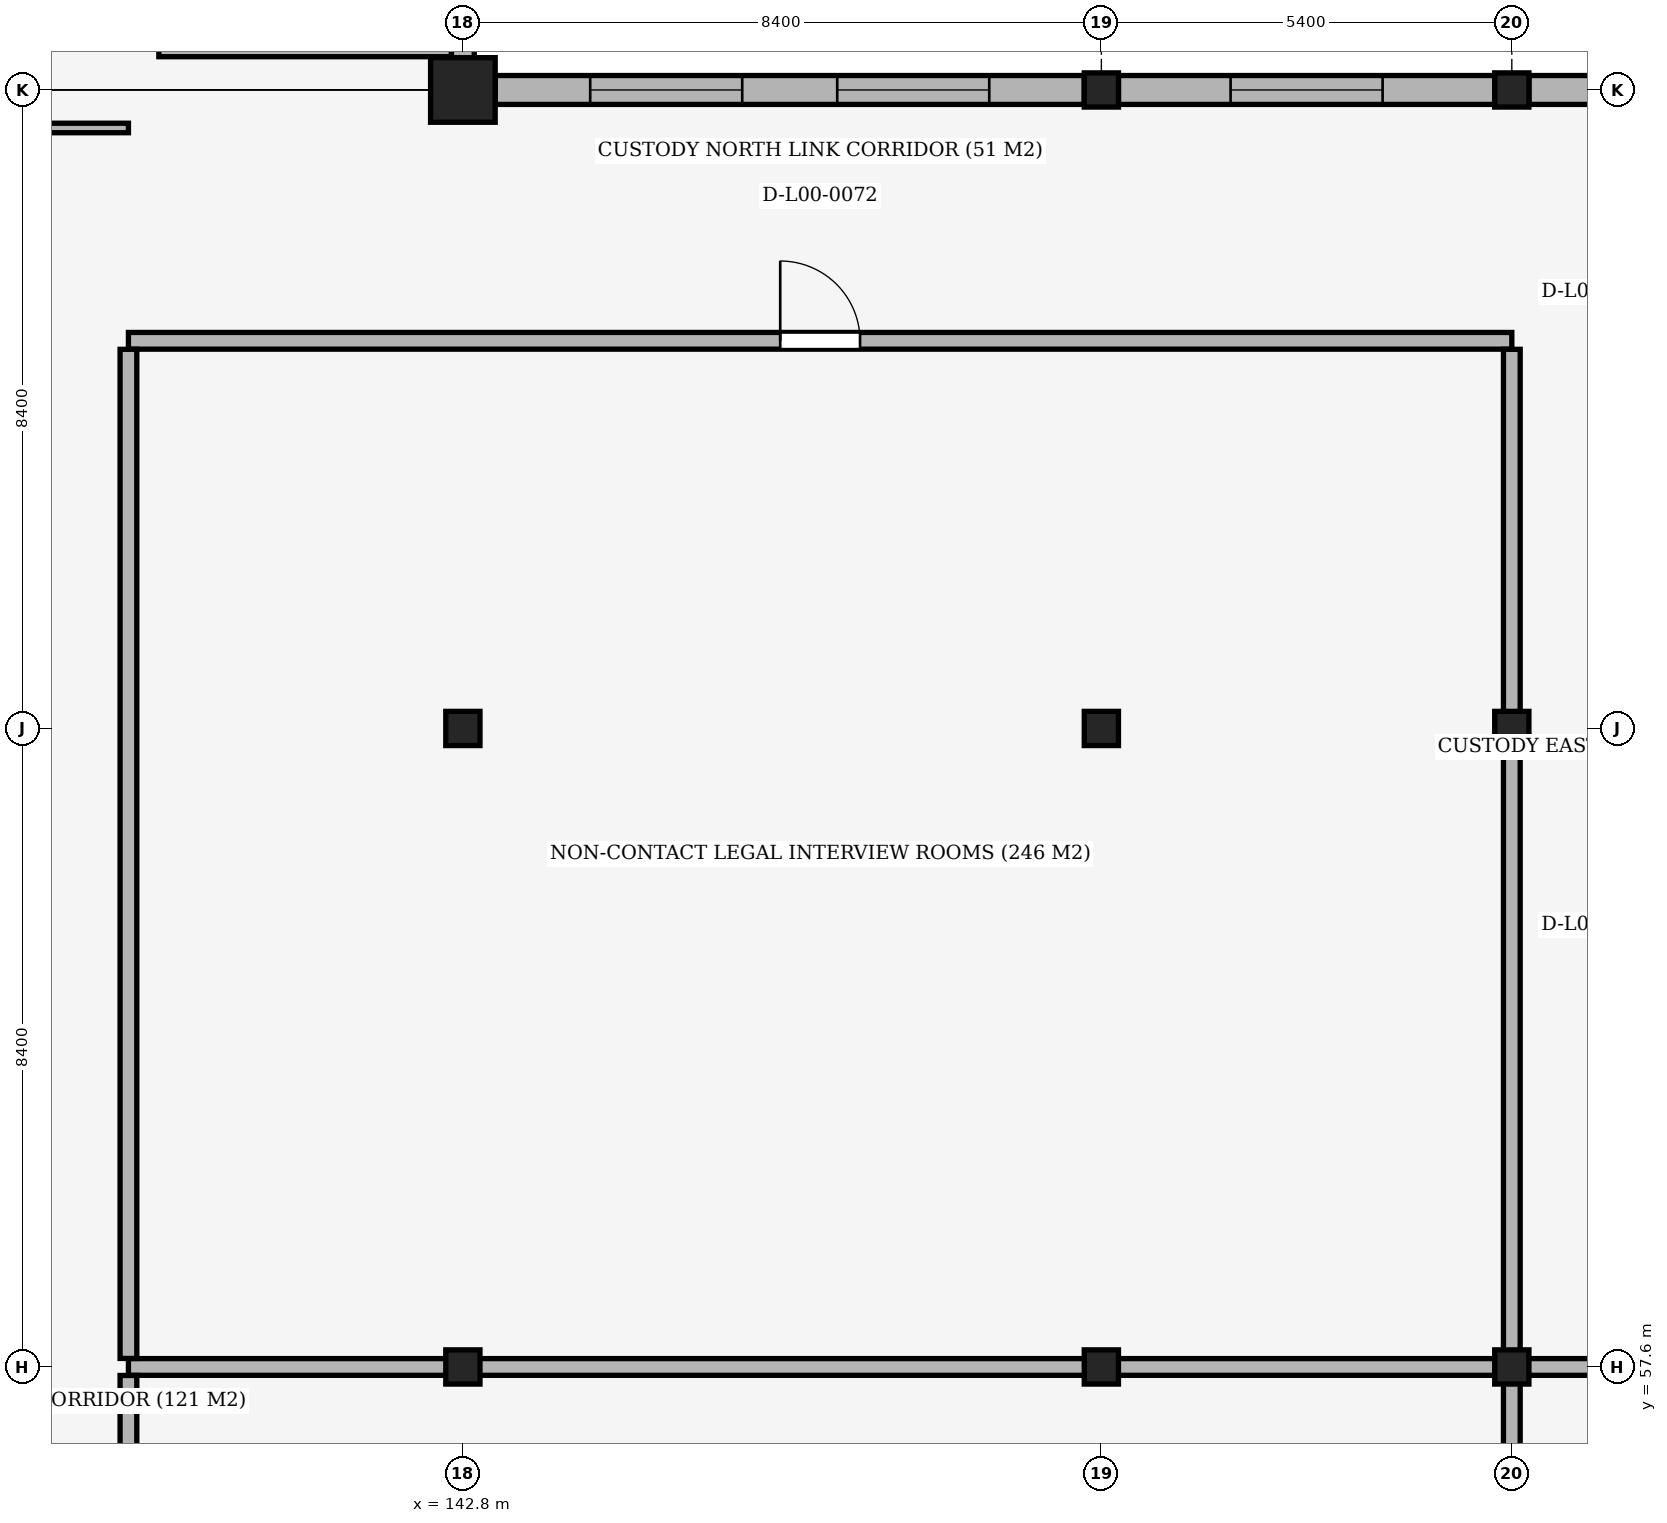
"""IFC4 building model, lengths in metres.
Left out: names, types, materials, properties, quantities, classifications, styles, units other than length and angle.
Written with IfcOpenShell. Run it as: python <this file> out.ifc"""

import sys

from ifc_helpers import new_model, si_unit, direction, frame, frame_2d, origin, origin_2d, place, context, subcontext, project, spatial, rectangle, extrude, element, fill, save


model = new_model("IFC4")
c1 = context("Model", 3, precision=1e-05, world=origin(), true_north=direction((0.0, 1.0)))
c2 = subcontext(c1, "Body", "Model", "MODEL_VIEW")
j1 = project(units=[si_unit("LENGTHUNIT", "METRE"), si_unit("PLANEANGLEUNIT", "RADIAN")], contexts=[c1])
p1 = place(None, origin())
s1 = spatial("IfcSite", under=j1, at=p1, CompositionType="ELEMENT")
p2 = place(p1, origin())
s2 = spatial("IfcBuilding", under=s1, at=p2, CompositionType="ELEMENT")
p3 = place(p2, origin())
s3 = spatial("IfcBuildingStorey", under=s2, at=p3, CompositionType="ELEMENT", Elevation=0.0)
for number, where, z_axis, x_axis in (
    (1, (142.8, 57.6, 0.0), (0.0, 0.0, 1.0), (1.0, 0.0, 0.0)),
    (2, (142.8, 66.0, 0.0), (0.0, 0.0, 1.0), (1.0, 0.0, 0.0)),
):
    element("IfcColumn", number, at=place(p3, frame(where, z_axis=z_axis, x_axis=x_axis)), inside=s3, PredefinedType="COLUMN", context=c2, shape_type="SweptSolid", body=[
        extrude(rectangle(XDim=0.45, YDim=0.45, at=origin_2d()), origin(), (0.0, 0.0, 1.0), 5.1),
    ])
p4 = place(p3, frame((142.8, 74.4, 0.0), z_axis=(0.0, 0.0, 1.0), x_axis=(1.0, 0.0, 0.0)))
e3 = element("IfcColumn", 3, at=p4, inside=s3, PredefinedType="COLUMN", context=c2, shape_type="SweptSolid", body=[
    extrude(rectangle(XDim=0.85, YDim=0.85, at=origin_2d()), origin(), (0.0, 0.0, 1.0), 5.1),
])
for number, where, z_axis, x_axis in (
    (4, (151.2, 57.6, 0.0), (0.0, 0.0, 1.0), (1.0, 0.0, 0.0)),
    (5, (151.2, 66.0, 0.0), (0.0, 0.0, 1.0), (1.0, 0.0, 0.0)),
    (6, (151.2, 74.4, 0.0), (0.0, 0.0, 1.0), (1.0, 0.0, 0.0)),
    (7, (156.6, 57.6, 0.0), (0.0, 0.0, 1.0), (1.0, 0.0, 0.0)),
    (8, (156.6, 66.0, 0.0), (0.0, 0.0, 1.0), (1.0, 0.0, 0.0)),
    (9, (156.6, 74.4, 0.0), (0.0, 0.0, 1.0), (1.0, 0.0, 0.0)),
):
    element("IfcColumn", number, at=place(p3, frame(where, z_axis=z_axis, x_axis=x_axis)), inside=s3, PredefinedType="COLUMN", context=c2, shape_type="SweptSolid", body=[
        extrude(rectangle(XDim=0.45, YDim=0.45, at=origin_2d()), origin(), (0.0, 0.0, 1.0), 5.1),
    ])
p5 = place(p3, frame((142.8, 79.375, 0.0), z_axis=(0.0, 0.0, 1.0), x_axis=(0.0, -1.0, 0.0)))
e10 = element("IfcWall", 10, at=p5, inside=s3, PredefinedType="SOLIDWALL", context=c2, shape_type="SweptSolid", body=[
    extrude(rectangle(XDim=4.55, YDim=0.3, at=frame_2d((2.275, 0.0))), origin(), (0.0, 0.0, 1.0), 4.17),
])
p6 = place(p5, frame((0.717, 0.0, 0.85)))
e11 = element("IfcOpeningElement", 11, at=p6, cuts=e10, PredefinedType="OPENING", context=c2, shape_type="SweptSolid", body=[
    extrude(rectangle(XDim=1.2, YDim=2.4, at=frame_2d((0.6, 1.2))), frame((0.0, 0.165, 0.0), z_axis=(0.0, -1.0, 0.0), x_axis=(1.0, 0.0, 0.0)), (0.0, 0.0, 1.0), 0.33),
])
p7 = place(p5, frame((2.633, 0.0, 0.85)))
e12 = element("IfcOpeningElement", 12, at=p7, cuts=e10, PredefinedType="OPENING", context=c2, shape_type="SweptSolid", body=[
    extrude(rectangle(XDim=1.2, YDim=2.4, at=frame_2d((0.6, 1.2))), frame((0.0, 0.165, 0.0), z_axis=(0.0, -1.0, 0.0), x_axis=(1.0, 0.0, 0.0)), (0.0, 0.0, 1.0), 0.33),
])
p8 = place(p3, frame((143.225, 74.4, 0.0), z_axis=(0.0, 0.0, 1.0), x_axis=(1.0, 0.0, 0.0)))
e13 = element("IfcWall", 13, at=p8, inside=s3, PredefinedType="SOLIDWALL", context=c2, shape_type="SweptSolid", body=[
    extrude(rectangle(XDim=7.75, YDim=0.38, at=frame_2d((3.875, 0.0))), origin(), (0.0, 0.0, 1.0), 4.07),
])
p9 = place(p8, frame((1.25, 0.0, 2.1)))
e14 = element("IfcOpeningElement", 14, at=p9, cuts=e13, PredefinedType="OPENING", context=c2, shape_type="SweptSolid", body=[
    extrude(rectangle(XDim=2.0, YDim=1.2, at=frame_2d((1.0, 0.6))), frame((0.0, 0.205, 0.0), z_axis=(0.0, -1.0, 0.0), x_axis=(1.0, 0.0, 0.0)), (0.0, 0.0, 1.0), 0.41),
])
p10 = place(p8, frame((4.5, 0.0, 2.1)))
e15 = element("IfcOpeningElement", 15, at=p10, cuts=e13, PredefinedType="OPENING", context=c2, shape_type="SweptSolid", body=[
    extrude(rectangle(XDim=2.0, YDim=1.2, at=frame_2d((1.0, 0.6))), frame((0.0, 0.205, 0.0), z_axis=(0.0, -1.0, 0.0), x_axis=(1.0, 0.0, 0.0)), (0.0, 0.0, 1.0), 0.41),
])
p11 = place(p3, frame((151.425, 74.4, 0.0), z_axis=(0.0, 0.0, 1.0), x_axis=(1.0, 0.0, 0.0)))
e16 = element("IfcWall", 16, at=p11, inside=s3, PredefinedType="SOLIDWALL", context=c2, shape_type="SweptSolid", body=[
    extrude(rectangle(XDim=4.95, YDim=0.38, at=frame_2d((2.475, 0.0))), origin(), (0.0, 0.0, 1.0), 4.07),
])
p12 = place(p11, frame((1.475, 0.0, 2.1)))
e17 = element("IfcOpeningElement", 17, at=p12, cuts=e16, PredefinedType="OPENING", context=c2, shape_type="SweptSolid", body=[
    extrude(rectangle(XDim=2.0, YDim=1.2, at=frame_2d((1.0, 0.6))), frame((0.0, 0.205, 0.0), z_axis=(0.0, -1.0, 0.0), x_axis=(1.0, 0.0, 0.0)), (0.0, 0.0, 1.0), 0.41),
])
p13 = place(p3, frame((156.825, 74.4, 0.0), z_axis=(0.0, 0.0, 1.0), x_axis=(1.0, 0.0, 0.0)))
e18 = element("IfcWall", 18, at=p13, inside=s3, PredefinedType="SOLIDWALL", context=c2, shape_type="SweptSolid", body=[
    extrude(rectangle(XDim=4.95, YDim=0.38, at=frame_2d((2.475, 0.0))), origin(), (0.0, 0.0, 1.0), 4.22),
])
p14 = place(p3, frame((138.4, 57.6, 0.0), z_axis=(0.0, 0.0, 1.0), x_axis=(1.0, 0.0, 0.0)))
e19 = element("IfcWall", 19, at=p14, inside=s3, PredefinedType="PARTITIONING", context=c2, shape_type="SweptSolid", body=[
    extrude(rectangle(XDim=18.2, YDim=0.22, at=frame_2d((9.1, 0.0))), origin(), (0.0, 0.0, 1.0), 4.02),
])
p15 = place(p3, frame((156.6, 57.6, 0.0), z_axis=(0.0, 0.0, 1.0), x_axis=(1.0, 0.0, 0.0)))
e20 = element("IfcWall", 20, at=p15, inside=s3, PredefinedType="PARTITIONING", context=c2, shape_type="SweptSolid", body=[
    extrude(rectangle(XDim=3.6, YDim=0.22, at=frame_2d((1.8, 0.0))), origin(), (0.0, 0.0, 1.0), 4.02),
])
p16 = place(p15, frame((1.275, 0.0, 0.0)))
e21 = element("IfcOpeningElement", 21, at=p16, cuts=e20, PredefinedType="OPENING", context=c2, shape_type="SweptSolid", body=[
    extrude(rectangle(XDim=1.05, YDim=2.15, at=frame_2d((0.525, 1.075))), frame((0.0, 0.125, 0.0), z_axis=(0.0, -1.0, 0.0), x_axis=(1.0, 0.0, 0.0)), (0.0, 0.0, 1.0), 0.25),
])
p17 = place(p3, frame((138.4, 71.1, 0.0), z_axis=(0.0, 0.0, 1.0), x_axis=(1.0, 0.0, 0.0)))
e22 = element("IfcWall", 22, at=p17, inside=s3, PredefinedType="PARTITIONING", context=c2, shape_type="SweptSolid", body=[
    extrude(rectangle(XDim=18.2, YDim=0.22, at=frame_2d((9.1, 0.0))), origin(), (0.0, 0.0, 1.0), 4.02),
])
p18 = place(p17, frame((8.575, 0.0, 0.0)))
e23 = element("IfcOpeningElement", 23, at=p18, cuts=e22, PredefinedType="OPENING", context=c2, shape_type="SweptSolid", body=[
    extrude(rectangle(XDim=1.05, YDim=2.15, at=frame_2d((0.525, 1.075))), frame((0.0, 0.125, 0.0), z_axis=(0.0, -1.0, 0.0), x_axis=(1.0, 0.0, 0.0)), (0.0, 0.0, 1.0), 0.25),
])
p19 = place(p3, frame((134.592, 73.9, 0.0), z_axis=(0.0, 0.0, 1.0), x_axis=(1.0, 0.0, 0.0)))
e24 = element("IfcWall", 24, at=p19, inside=s3, PredefinedType="PARTITIONING", context=c2, shape_type="SweptSolid", body=[
    extrude(rectangle(XDim=3.808, YDim=0.125, at=frame_2d((1.904, 0.0))), origin(), (0.0, 0.0, 1.0), 4.02),
])
p20 = place(p3, frame((138.8, 74.9, 0.0), z_axis=(0.0, 0.0, 1.0), x_axis=(1.0, 0.0, 0.0)))
e25 = element("IfcWall", 25, at=p20, inside=s3, PredefinedType="PARTITIONING", context=c2, shape_type="SweptSolid", body=[
    extrude(rectangle(XDim=3.848, YDim=0.125, at=frame_2d((1.924, 0.0))), origin(), (0.0, 0.0, 1.0), 4.17),
])
p21 = place(p3, frame((138.4, 41.2, 0.0), z_axis=(0.0, 0.0, 1.0), x_axis=(0.0, 1.0, 0.0)))
e26 = element("IfcWall", 26, at=p21, inside=s3, PredefinedType="PARTITIONING", context=c2, shape_type="SweptSolid", body=[
    extrude(rectangle(XDim=16.288, YDim=0.22, at=frame_2d((8.144, 0.0))), origin(), (0.0, 0.0, 1.0), 4.07),
])
p22 = place(p21, frame((7.619, 0.0, 0.0)))
e27 = element("IfcOpeningElement", 27, at=p22, cuts=e26, PredefinedType="OPENING", context=c2, shape_type="SweptSolid", body=[
    extrude(rectangle(XDim=1.05, YDim=2.15, at=frame_2d((0.525, 1.075))), frame((0.0, 0.125, 0.0), z_axis=(0.0, -1.0, 0.0), x_axis=(1.0, 0.0, 0.0)), (0.0, 0.0, 1.0), 0.25),
])
p23 = place(p3, frame((138.4, 57.712, 0.0), z_axis=(0.0, 0.0, 1.0), x_axis=(0.0, 1.0, 0.0)))
e28 = element("IfcWall", 28, at=p23, inside=s3, PredefinedType="PARTITIONING", context=c2, shape_type="SweptSolid", body=[
    extrude(rectangle(XDim=13.276, YDim=0.22, at=frame_2d((6.638, 0.0))), origin(), (0.0, 0.0, 1.0), 4.07),
])
p24 = place(p3, frame((156.6, 40.853, 0.0), z_axis=(0.0, 0.0, 1.0), x_axis=(0.0, 1.0, 0.0)))
e29 = element("IfcWall", 29, at=p24, inside=s3, PredefinedType="PARTITIONING", context=c2, shape_type="SweptSolid", body=[
    extrude(rectangle(XDim=16.635, YDim=0.22, at=frame_2d((8.317, 0.0))), origin(), (0.0, 0.0, 1.0), 4.02),
])
p25 = place(p3, frame((156.6, 57.712, 0.0), z_axis=(0.0, 0.0, 1.0), x_axis=(0.0, 1.0, 0.0)))
e30 = element("IfcWall", 30, at=p25, inside=s3, PredefinedType="PARTITIONING", context=c2, shape_type="SweptSolid", body=[
    extrude(rectangle(XDim=13.276, YDim=0.22, at=frame_2d((6.638, 0.0))), origin(), (0.0, 0.0, 1.0), 4.02),
])
p26 = place(p9, origin())
e31 = element("IfcWindow", 31, at=p26, inside=s3, PartitioningType="SINGLE_PANEL", PredefinedType="WINDOW", context=c2, shape_type="SweptSolid", body=[
    extrude(rectangle(XDim=2.0, YDim=1.2, at=frame_2d((1.0, 0.6))), frame((0.0, 0.03, 0.0), z_axis=(0.0, -1.0, 0.0), x_axis=(1.0, 0.0, 0.0)), (0.0, 0.0, 1.0), 0.06),
])
fill(e14, e31)
p27 = place(p10, origin())
e32 = element("IfcWindow", 32, at=p27, inside=s3, PartitioningType="SINGLE_PANEL", PredefinedType="WINDOW", context=c2, shape_type="SweptSolid", body=[
    extrude(rectangle(XDim=2.0, YDim=1.2, at=frame_2d((1.0, 0.6))), frame((0.0, 0.03, 0.0), z_axis=(0.0, -1.0, 0.0), x_axis=(1.0, 0.0, 0.0)), (0.0, 0.0, 1.0), 0.06),
])
fill(e15, e32)
p28 = place(p12, origin())
e33 = element("IfcWindow", 33, at=p28, inside=s3, PartitioningType="SINGLE_PANEL", PredefinedType="WINDOW", context=c2, shape_type="SweptSolid", body=[
    extrude(rectangle(XDim=2.0, YDim=1.2, at=frame_2d((1.0, 0.6))), frame((0.0, 0.03, 0.0), z_axis=(0.0, -1.0, 0.0), x_axis=(1.0, 0.0, 0.0)), (0.0, 0.0, 1.0), 0.06),
])
fill(e17, e33)
p29 = place(p18, origin())
e34 = element("IfcDoor", 34, at=p29, inside=s3, OperationType="SINGLE_SWING_LEFT", PredefinedType="DOOR", context=c2, shape_type="SweptSolid", body=[
    extrude(rectangle(XDim=1.05, YDim=2.15, at=frame_2d((0.525, 1.075))), frame((0.0, 0.025, 0.0), z_axis=(0.0, -1.0, 0.0), x_axis=(1.0, 0.0, 0.0)), (0.0, 0.0, 1.0), 0.05),
])
fill(e23, e34)
save(model, sys.argv[1])
